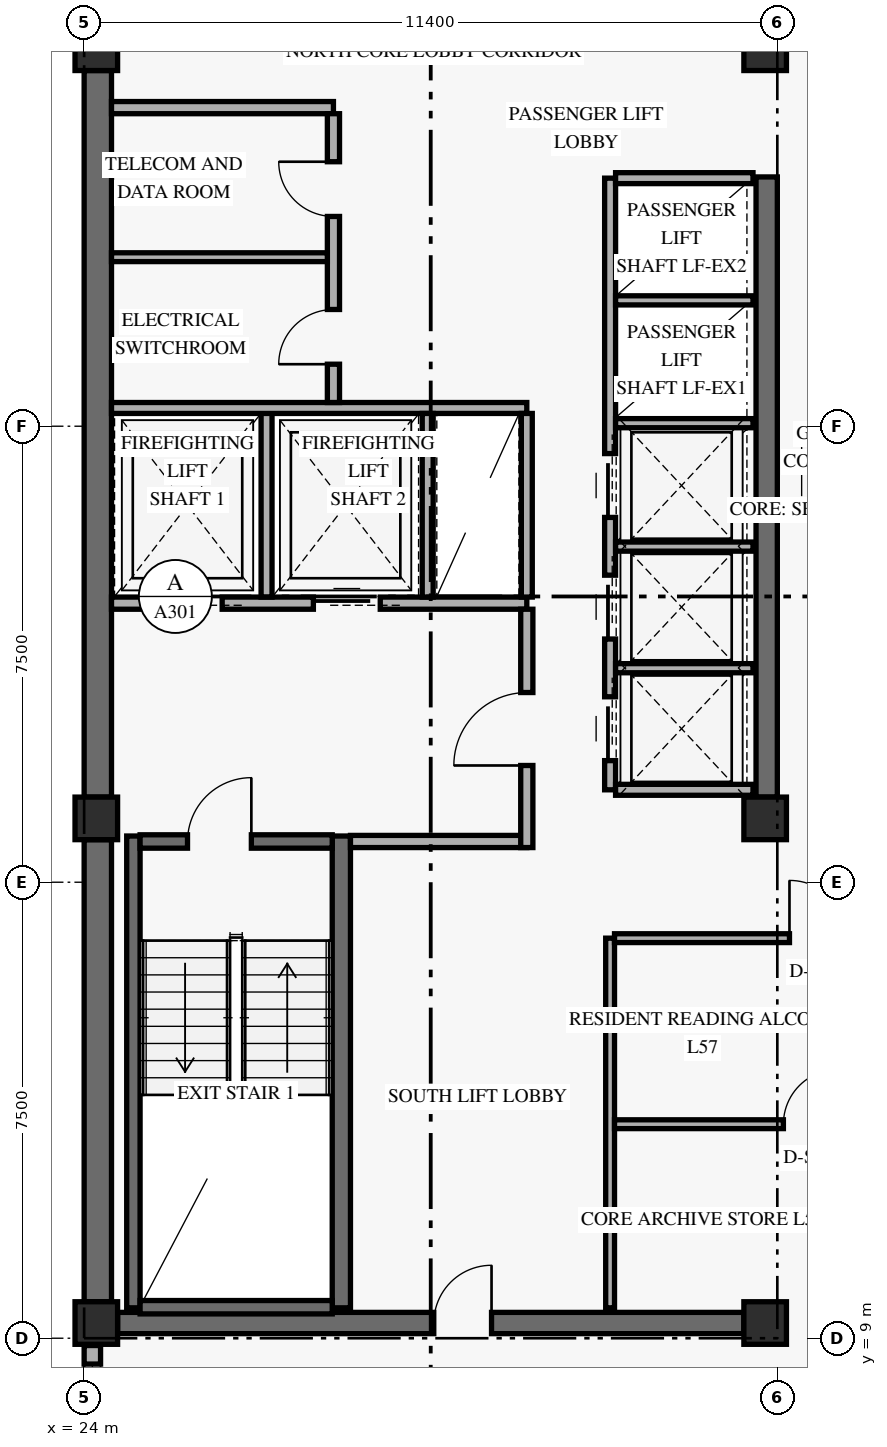
"""IFC4 building model, lengths in metres.
Left out: names, types, materials, properties, quantities, classifications, styles, units other than length and angle.
Written with IfcOpenShell. Run it as: python <this file> out.ifc"""

import sys

from ifc_helpers import new_model, si_unit, direction, frame, frame_2d, origin, origin_2d, place, context, subcontext, project, spatial, rectangle, extrude, element, fill, save


model = new_model("IFC4")
c1 = context("Model", 3, precision=1e-05, world=origin(), true_north=direction((0.0, 1.0)))
c2 = subcontext(c1, "Body", "Model", "MODEL_VIEW")
j1 = project(units=[si_unit("LENGTHUNIT", "METRE"), si_unit("PLANEANGLEUNIT", "RADIAN")], contexts=[c1])
p1 = place(None, origin())
s1 = spatial("IfcSite", under=j1, at=p1, CompositionType="ELEMENT")
p2 = place(p1, origin())
s2 = spatial("IfcBuilding", under=s1, at=p2, CompositionType="ELEMENT")
p3 = place(p2, frame((0.0, 0.0, 220.2)))
s3 = spatial("IfcBuildingStorey", under=s2, at=p3, CompositionType="ELEMENT", Elevation=220.2)
p4 = place(p3, frame((24.225, 9.6, 0.0), z_axis=(0.0, 0.0, 1.0), x_axis=(0.0, 1.0, 0.0)))
e1 = element("IfcWall", 1, at=p4, inside=s3, PredefinedType="SHEAR", context=c2, shape_type="SweptSolid", body=[
    extrude(rectangle(XDim=7.6, YDim=0.45, at=frame_2d((3.8, 0.0))), origin(), (0.0, 0.0, 1.0), 2.821),
])
p5 = place(p3, frame((24.225, 17.9, 0.0), z_axis=(0.0, 0.0, 1.0), x_axis=(0.0, 1.0, 0.0)))
e2 = element("IfcWall", 2, at=p5, inside=s3, PredefinedType="SHEAR", context=c2, shape_type="SweptSolid", body=[
    extrude(rectangle(XDim=11.95, YDim=0.45, at=frame_2d((5.975, 0.0))), origin(), (0.0, 0.0, 1.0), 2.821),
])
p6 = place(p3, frame((35.225, 17.9, 0.0), z_axis=(0.0, 0.0, 1.0), x_axis=(0.0, 1.0, 0.0)))
e3 = element("IfcWall", 3, at=p6, inside=s3, PredefinedType="SHEAR", context=c2, shape_type="SweptSolid", body=[
    extrude(rectangle(XDim=10.2, YDim=0.35, at=frame_2d((5.1, 0.0))), origin(), (0.0, 0.0, 1.0), 2.821),
])
p7 = place(p3, frame((24.55, 9.25, 0.0), z_axis=(0.0, 0.0, 1.0), x_axis=(1.0, 0.0, 0.0)))
e4 = element("IfcWall", 4, at=p7, inside=s3, PredefinedType="SHEAR", context=c2, shape_type="SweptSolid", body=[
    extrude(rectangle(XDim=10.3, YDim=0.35, at=frame_2d((5.15, 0.0))), origin(), (0.0, 0.0, 1.0), 3.36),
])
p8 = place(p7, frame((5.2, 0.0, 0.0)))
e5 = element("IfcOpeningElement", 5, at=p8, cuts=e4, PredefinedType="OPENING", context=c2, shape_type="SweptSolid", body=[
    extrude(rectangle(XDim=0.95, YDim=2.15, at=frame_2d((0.475, 1.075))), frame((0.0, 0.185, 0.0), z_axis=(0.0, -1.0, 0.0), x_axis=(1.0, 0.0, 0.0)), (0.0, 0.0, 1.0), 0.37),
])
p9 = place(p3, frame((24.81, 9.5, 0.0), z_axis=(0.0, 0.0, 1.0), x_axis=(0.0, 1.0, 0.0)))
e6 = element("IfcWall", 6, at=p9, inside=s3, PredefinedType="SHEAR", context=c2, shape_type="SweptSolid", body=[
    extrude(rectangle(XDim=7.76, YDim=0.22, at=frame_2d((3.88, 0.0))), origin(), (0.0, 0.0, 1.0), 3.36),
])
p10 = place(p3, frame((28.23, 9.5, 0.0), z_axis=(0.0, 0.0, 1.0), x_axis=(0.0, 1.0, 0.0)))
e7 = element("IfcWall", 7, at=p10, inside=s3, PredefinedType="SHEAR", context=c2, shape_type="SweptSolid", body=[
    extrude(rectangle(XDim=7.76, YDim=0.3, at=frame_2d((3.88, 0.0))), origin(), (0.0, 0.0, 1.0), 3.36),
])
p11 = place(p3, frame((24.92, 9.51, 0.0), z_axis=(0.0, 0.0, 1.0), x_axis=(1.0, 0.0, 0.0)))
e8 = element("IfcWall", 8, at=p11, inside=s3, PredefinedType="SHEAR", context=c2, shape_type="SweptSolid", body=[
    extrude(rectangle(XDim=3.16, YDim=0.22, at=frame_2d((1.58, 0.0))), origin(), (0.0, 0.0, 1.0), 3.36),
])
p12 = place(p3, frame((24.92, 17.17, 0.0), z_axis=(0.0, 0.0, 1.0), x_axis=(1.0, 0.0, 0.0)))
e9 = element("IfcWall", 9, at=p12, inside=s3, PredefinedType="SHEAR", context=c2, shape_type="SweptSolid", body=[
    extrude(rectangle(XDim=3.16, YDim=0.22, at=frame_2d((1.58, 0.0))), origin(), (0.0, 0.0, 1.0), 3.36),
])
p13 = place(p12, frame((0.78, 0.0, 0.0)))
e10 = element("IfcOpeningElement", 10, at=p13, cuts=e9, PredefinedType="OPENING", context=c2, shape_type="SweptSolid", body=[
    extrude(rectangle(XDim=1.05, YDim=2.15, at=frame_2d((0.525, 1.075))), frame((0.0, 0.12, 0.0), z_axis=(0.0, -1.0, 0.0), x_axis=(1.0, 0.0, 0.0)), (0.0, 0.0, 1.0), 0.24),
])
for number, where, z_axis, x_axis in (
    (11, (24.2, 9.25, 0.0), (0.0, 0.0, 1.0), (1.0, 0.0, 0.0)),
    (12, (24.2, 17.55, 0.0), (0.0, 0.0, 1.0), (1.0, 0.0, 0.0)),
    (13, (24.2, 30.2, 0.0), (0.0, 0.0, 1.0), (1.0, 0.0, 0.0)),
    (14, (35.2, 9.25, 0.0), (0.0, 0.0, 1.0), (1.0, 0.0, 0.0)),
    (15, (35.2, 17.55, 0.0), (0.0, 0.0, 1.0), (1.0, 0.0, 0.0)),
    (16, (35.2, 30.2, 0.0), (0.0, 0.0, 1.0), (1.0, 0.0, 0.0)),
):
    element("IfcColumn", number, at=place(p3, frame(where, z_axis=z_axis, x_axis=x_axis)), inside=s3, PredefinedType="COLUMN", context=c2, shape_type="SweptSolid", body=[
        extrude(rectangle(XDim=0.7, YDim=0.7, at=origin_2d()), origin(), (0.0, 0.0, 1.0), 3.6),
    ])
p14 = place(p3, frame((24.135, 7.32, 0.0), z_axis=(0.0, 0.0, 1.0), x_axis=(0.0, 1.0, 0.0)))
e17 = element("IfcWall", 17, at=p14, inside=s3, PredefinedType="SOLIDWALL", context=c2, shape_type="SweptSolid", body=[
    extrude(rectangle(XDim=1.56, YDim=0.27, at=frame_2d((0.78, 0.0))), origin(), (0.0, 0.0, 1.0), 2.803),
])
p15 = place(p14, frame((0.305, 0.0, 0.85)))
e18 = element("IfcOpeningElement", 18, at=p15, cuts=e17, PredefinedType="OPENING", context=c2, shape_type="SweptSolid", body=[
    extrude(rectangle(XDim=0.95, YDim=1.5, at=frame_2d((0.475, 0.75))), frame((0.0, 0.145, 0.0), z_axis=(0.0, -1.0, 0.0), x_axis=(1.0, 0.0, 0.0)), (0.0, 0.0, 1.0), 0.29),
])
p16 = place(p3, frame((24.45, 21.09, 0.0), z_axis=(0.0, 0.0, 1.0), x_axis=(1.0, 0.0, 0.0)))
e19 = element("IfcWall", 19, at=p16, inside=s3, PredefinedType="STANDARD", context=c2, shape_type="SweptSolid", body=[
    extrude(rectangle(XDim=6.83, YDim=0.2, at=frame_2d((3.415, 0.0))), origin(), (0.0, 0.0, 1.0), 3.36),
])
p17 = place(p16, frame((0.72, 0.0, 0.0)))
e20 = element("IfcOpeningElement", 20, at=p17, cuts=e19, PredefinedType="OPENING", context=c2, shape_type="SweptSolid", body=[
    extrude(rectangle(XDim=1.1, YDim=2.2, at=frame_2d((0.55, 1.1))), frame((0.0, 0.11, 0.0), z_axis=(0.0, -1.0, 0.0), x_axis=(1.0, 0.0, 0.0)), (0.0, 0.0, 1.0), 0.22),
])
p18 = place(p16, frame((3.32, 0.0, 0.0)))
e21 = element("IfcOpeningElement", 21, at=p18, cuts=e19, PredefinedType="OPENING", context=c2, shape_type="SweptSolid", body=[
    extrude(rectangle(XDim=1.1, YDim=2.2, at=frame_2d((0.55, 1.1))), frame((0.0, 0.11, 0.0), z_axis=(0.0, -1.0, 0.0), x_axis=(1.0, 0.0, 0.0)), (0.0, 0.0, 1.0), 0.22),
])
p19 = place(p3, frame((28.38, 17.17, 0.0), z_axis=(0.0, 0.0, 1.0), x_axis=(1.0, 0.0, 0.0)))
e22 = element("IfcWall", 22, at=p19, inside=s3, PredefinedType="STANDARD", context=c2, shape_type="SweptSolid", body=[
    extrude(rectangle(XDim=2.9, YDim=0.2, at=frame_2d((1.45, 0.0))), origin(), (0.0, 0.0, 1.0), 3.36),
])
p20 = place(p3, frame((31.28, 17.07, 0.0), z_axis=(0.0, 0.0, 1.0), x_axis=(0.0, 1.0, 0.0)))
e23 = element("IfcWall", 23, at=p20, inside=s3, PredefinedType="STANDARD", context=c2, shape_type="SweptSolid", body=[
    extrude(rectangle(XDim=3.92, YDim=0.2, at=frame_2d((1.96, 0.0))), origin(), (0.0, 0.0, 1.0), 2.803),
])
p21 = place(p20, frame((1.35, 0.0, 0.0)))
e24 = element("IfcOpeningElement", 24, at=p21, cuts=e23, PredefinedType="OPENING", context=c2, shape_type="SweptSolid", body=[
    extrude(rectangle(XDim=1.2, YDim=2.15, at=frame_2d((0.6, 1.075))), frame((0.0, 0.11, 0.0), z_axis=(0.0, -1.0, 0.0), x_axis=(1.0, 0.0, 0.0)), (0.0, 0.0, 1.0), 0.22),
])
p22 = place(p3, frame((27.0, 21.19, 0.0), z_axis=(0.0, 0.0, 1.0), x_axis=(0.0, 1.0, 0.0)))
e25 = element("IfcWall", 25, at=p22, inside=s3, PredefinedType="STANDARD", context=c2, shape_type="SweptSolid", body=[
    extrude(rectangle(XDim=3.11, YDim=0.18, at=frame_2d((1.555, 0.0))), origin(), (0.0, 0.0, 1.0), 3.36),
])
p23 = place(p3, frame((24.45, 24.3, 0.0), z_axis=(0.0, 0.0, 1.0), x_axis=(1.0, 0.0, 0.0)))
e26 = element("IfcWall", 26, at=p23, inside=s3, PredefinedType="STANDARD", context=c2, shape_type="SweptSolid", body=[
    extrude(rectangle(XDim=6.83, YDim=0.18, at=frame_2d((3.415, 0.0))), origin(), (0.0, 0.0, 1.0), 3.36),
])
for number, where, z_axis, x_axis in (
    (27, (29.65, 21.19, 0.0), (0.0, 0.0, 1.0), (0.0, 1.0, 0.0)),
    (28, (31.28, 21.19, 0.0), (0.0, 0.0, 1.0), (0.0, 1.0, 0.0)),
):
    element("IfcWall", number, at=place(p3, frame(where, z_axis=z_axis, x_axis=x_axis)), inside=s3, PredefinedType="STANDARD", context=c2, shape_type="SweptSolid", body=[
        extrude(rectangle(XDim=3.02, YDim=0.18, at=frame_2d((1.51, 0.0))), origin(), (0.0, 0.0, 1.0), 3.36),
    ])
p24 = place(p3, frame((24.45, 29.24, 0.0), z_axis=(0.0, 0.0, 1.0), x_axis=(1.0, 0.0, 0.0)))
e29 = element("IfcWall", 29, at=p24, inside=s3, PredefinedType="STANDARD", context=c2, shape_type="SweptSolid", body=[
    extrude(rectangle(XDim=3.65, YDim=0.2, at=frame_2d((1.825, 0.0))), origin(), (0.0, 0.0, 1.0), 3.36),
])
p25 = place(p3, frame((28.1, 24.39, 0.0), z_axis=(0.0, 0.0, 1.0), x_axis=(0.0, 1.0, 0.0)))
e30 = element("IfcWall", 30, at=p25, inside=s3, PredefinedType="STANDARD", context=c2, shape_type="SweptSolid", body=[
    extrude(rectangle(XDim=4.75, YDim=0.2, at=frame_2d((2.375, 0.0))), origin(), (0.0, 0.0, 1.0), 3.36),
])
p26 = place(p25, frame((0.63, 0.0, 0.0)))
e31 = element("IfcOpeningElement", 31, at=p26, cuts=e30, PredefinedType="OPENING", context=c2, shape_type="SweptSolid", body=[
    extrude(rectangle(XDim=0.9, YDim=2.1, at=frame_2d((0.45, 1.05))), frame((0.0, 0.11, 0.0), z_axis=(0.0, -1.0, 0.0), x_axis=(1.0, 0.0, 0.0)), (0.0, 0.0, 1.0), 0.22),
])
p27 = place(p25, frame((3.06, 0.0, 0.0)))
e32 = element("IfcOpeningElement", 32, at=p27, cuts=e30, PredefinedType="OPENING", context=c2, shape_type="SweptSolid", body=[
    extrude(rectangle(XDim=0.9, YDim=2.1, at=frame_2d((0.45, 1.05))), frame((0.0, 0.11, 0.0), z_axis=(0.0, -1.0, 0.0), x_axis=(1.0, 0.0, 0.0)), (0.0, 0.0, 1.0), 0.22),
])
p28 = place(p3, frame((24.45, 26.78, 0.0), z_axis=(0.0, 0.0, 1.0), x_axis=(1.0, 0.0, 0.0)))
e33 = element("IfcWall", 33, at=p28, inside=s3, PredefinedType="PARTITIONING", context=c2, shape_type="SweptSolid", body=[
    extrude(rectangle(XDim=3.55, YDim=0.145, at=frame_2d((1.775, 0.0))), origin(), (0.0, 0.0, 1.0), 3.36),
])
p29 = place(p3, frame((32.65, 18.02, 0.0), z_axis=(0.0, 0.0, 1.0), x_axis=(0.0, 1.0, 0.0)))
e34 = element("IfcWall", 34, at=p29, inside=s3, PredefinedType="STANDARD", context=c2, shape_type="SweptSolid", body=[
    extrude(rectangle(XDim=10.06, YDim=0.18, at=frame_2d((5.03, 0.0))), origin(), (0.0, 0.0, 1.0), 3.36),
])
p30 = place(p29, frame((0.48, 0.0, 0.0)))
e35 = element("IfcOpeningElement", 35, at=p30, cuts=e34, PredefinedType="OPENING", context=c2, shape_type="SweptSolid", body=[
    extrude(rectangle(XDim=1.05, YDim=2.2, at=frame_2d((0.525, 1.1))), frame((0.0, 0.1, 0.0), z_axis=(0.0, -1.0, 0.0), x_axis=(1.0, 0.0, 0.0)), (0.0, 0.0, 1.0), 0.2),
])
p31 = place(p29, frame((2.48, 0.0, 0.0)))
e36 = element("IfcOpeningElement", 36, at=p31, cuts=e34, PredefinedType="OPENING", context=c2, shape_type="SweptSolid", body=[
    extrude(rectangle(XDim=1.05, YDim=2.2, at=frame_2d((0.525, 1.1))), frame((0.0, 0.1, 0.0), z_axis=(0.0, -1.0, 0.0), x_axis=(1.0, 0.0, 0.0)), (0.0, 0.0, 1.0), 0.2),
])
p32 = place(p29, frame((4.48, 0.0, 0.0)))
e37 = element("IfcOpeningElement", 37, at=p32, cuts=e34, PredefinedType="OPENING", context=c2, shape_type="SweptSolid", body=[
    extrude(rectangle(XDim=1.05, YDim=2.2, at=frame_2d((0.525, 1.1))), frame((0.0, 0.1, 0.0), z_axis=(0.0, -1.0, 0.0), x_axis=(1.0, 0.0, 0.0)), (0.0, 0.0, 1.0), 0.2),
])
for number, where, z_axis, x_axis in (
    (38, (32.74, 18.02, 0.0), (0.0, 0.0, 1.0), (1.0, 0.0, 0.0)),
    (39, (32.74, 28.08, 0.0), (0.0, 0.0, 1.0), (1.0, 0.0, 0.0)),
):
    element("IfcWall", number, at=place(p3, frame(where, z_axis=z_axis, x_axis=x_axis)), inside=s3, PredefinedType="STANDARD", context=c2, shape_type="SweptSolid", body=[
        extrude(rectangle(XDim=2.26, YDim=0.18, at=frame_2d((1.13, 0.0))), origin(), (0.0, 0.0, 1.0), 3.36),
    ])
for number, where, z_axis, x_axis in (
    (40, (32.74, 20.02, 0.0), (0.0, 0.0, 1.0), (1.0, 0.0, 0.0)),
    (41, (32.74, 22.02, 0.0), (0.0, 0.0, 1.0), (1.0, 0.0, 0.0)),
    (42, (32.74, 24.05, 0.0), (0.0, 0.0, 1.0), (1.0, 0.0, 0.0)),
    (43, (32.74, 26.07, 0.0), (0.0, 0.0, 1.0), (1.0, 0.0, 0.0)),
):
    element("IfcWall", number, at=place(p3, frame(where, z_axis=z_axis, x_axis=x_axis)), inside=s3, PredefinedType="STANDARD", context=c2, shape_type="SweptSolid", body=[
        extrude(rectangle(XDim=2.26, YDim=0.15, at=frame_2d((1.13, 0.0))), origin(), (0.0, 0.0, 1.0), 3.36),
    ])
p33 = place(p3, frame((32.65, 9.5, 0.0), z_axis=(0.0, 0.0, 1.0), x_axis=(0.0, 1.0, 0.0)))
e44 = element("IfcWall", 44, at=p33, inside=s3, PredefinedType="PARTITIONING", context=c2, shape_type="SweptSolid", body=[
    extrude(rectangle(XDim=6.08, YDim=0.145, at=frame_2d((3.04, 0.0))), origin(), (0.0, 0.0, 1.0), 3.36),
])
p34 = place(p3, frame((32.722, 15.58, 0.0), z_axis=(0.0, 0.0, 1.0), x_axis=(1.0, 0.0, 0.0)))
e45 = element("IfcWall", 45, at=p34, inside=s3, PredefinedType="PARTITIONING", context=c2, shape_type="SweptSolid", body=[
    extrude(rectangle(XDim=5.628, YDim=0.145, at=frame_2d((2.814, 0.0))), origin(), (0.0, 0.0, 1.0), 2.803),
])
p35 = place(p34, frame((2.877, 0.0, 0.0)))
e46 = element("IfcOpeningElement", 46, at=p35, cuts=e45, PredefinedType="OPENING", context=c2, shape_type="SweptSolid", body=[
    extrude(rectangle(XDim=0.95, YDim=2.15, at=frame_2d((0.475, 1.075))), frame((0.0, 0.083, 0.0), z_axis=(0.0, -1.0, 0.0), x_axis=(1.0, 0.0, 0.0)), (0.0, 0.0, 1.0), 0.165),
])
p36 = place(p3, frame((32.722, 12.52, 0.0), z_axis=(0.0, 0.0, 1.0), x_axis=(1.0, 0.0, 0.0)))
e47 = element("IfcWall", 47, at=p36, inside=s3, PredefinedType="PARTITIONING", context=c2, shape_type="SweptSolid", body=[
    extrude(rectangle(XDim=5.555, YDim=0.145, at=frame_2d((2.778, 0.0))), origin(), (0.0, 0.0, 1.0), 2.803),
])
p37 = place(p36, frame((2.778, 0.0, 0.0)))
e48 = element("IfcOpeningElement", 48, at=p37, cuts=e47, PredefinedType="OPENING", context=c2, shape_type="SweptSolid", body=[
    extrude(rectangle(XDim=0.9, YDim=2.1, at=frame_2d((0.45, 1.05))), frame((0.0, 0.083, 0.0), z_axis=(0.0, -1.0, 0.0), x_axis=(1.0, 0.0, 0.0)), (0.0, 0.0, 1.0), 0.165),
])
p38 = place(p15, origin())
e49 = element("IfcWindow", 49, at=p38, inside=s3, PartitioningType="SINGLE_PANEL", PredefinedType="WINDOW", context=c2, shape_type="SweptSolid", body=[
    extrude(rectangle(XDim=0.95, YDim=1.5, at=frame_2d((0.475, 0.75))), frame((0.0, 0.03, 0.0), z_axis=(0.0, -1.0, 0.0), x_axis=(1.0, 0.0, 0.0)), (0.0, 0.0, 1.0), 0.06),
])
fill(e18, e49)
p39 = place(p13, frame((1.05, 0.0, 0.0), z_axis=(0.0, 0.0, 1.0), x_axis=(-1.0, 0.0, 0.0)))
e50 = element("IfcDoor", 50, at=p39, inside=s3, OperationType="SINGLE_SWING_LEFT", PredefinedType="DOOR", context=c2, shape_type="SweptSolid", body=[
    extrude(rectangle(XDim=1.05, YDim=2.15, at=frame_2d((0.525, 1.075))), frame((0.0, 0.025, 0.0), z_axis=(0.0, -1.0, 0.0), x_axis=(1.0, 0.0, 0.0)), (0.0, 0.0, 1.0), 0.05),
])
fill(e10, e50)
p40 = place(p17, origin())
e51 = element("IfcDoor", 51, at=p40, inside=s3, OperationType="SLIDING_TO_LEFT", PredefinedType="DOOR", context=c2, shape_type="SweptSolid", body=[
    extrude(rectangle(XDim=1.1, YDim=2.2, at=frame_2d((0.55, 1.1))), frame((0.0, 0.025, 0.0), z_axis=(0.0, -1.0, 0.0), x_axis=(1.0, 0.0, 0.0)), (0.0, 0.0, 1.0), 0.05),
])
fill(e20, e51)
p41 = place(p18, origin())
e52 = element("IfcDoor", 52, at=p41, inside=s3, OperationType="SLIDING_TO_LEFT", PredefinedType="DOOR", context=c2, shape_type="SweptSolid", body=[
    extrude(rectangle(XDim=1.1, YDim=2.2, at=frame_2d((0.55, 1.1))), frame((0.0, 0.025, 0.0), z_axis=(0.0, -1.0, 0.0), x_axis=(1.0, 0.0, 0.0)), (0.0, 0.0, 1.0), 0.05),
])
fill(e21, e52)
p42 = place(p21, origin())
e53 = element("IfcDoor", 53, at=p42, inside=s3, OperationType="SINGLE_SWING_LEFT", PredefinedType="DOOR", context=c2, shape_type="SweptSolid", body=[
    extrude(rectangle(XDim=1.2, YDim=2.15, at=frame_2d((0.6, 1.075))), frame((0.0, 0.025, 0.0), z_axis=(0.0, -1.0, 0.0), x_axis=(1.0, 0.0, 0.0)), (0.0, 0.0, 1.0), 0.05),
])
fill(e24, e53)
p43 = place(p26, origin())
e54 = element("IfcDoor", 54, at=p43, inside=s3, OperationType="SINGLE_SWING_LEFT", PredefinedType="DOOR", context=c2, shape_type="SweptSolid", body=[
    extrude(rectangle(XDim=0.9, YDim=2.1, at=frame_2d((0.45, 1.05))), frame((0.0, 0.025, 0.0), z_axis=(0.0, -1.0, 0.0), x_axis=(1.0, 0.0, 0.0)), (0.0, 0.0, 1.0), 0.05),
])
fill(e31, e54)
p44 = place(p27, origin())
e55 = element("IfcDoor", 55, at=p44, inside=s3, OperationType="SINGLE_SWING_RIGHT", PredefinedType="DOOR", context=c2, shape_type="SweptSolid", body=[
    extrude(rectangle(XDim=0.9, YDim=2.1, at=frame_2d((0.45, 1.05))), frame((0.0, 0.025, 0.0), z_axis=(0.0, -1.0, 0.0), x_axis=(1.0, 0.0, 0.0)), (0.0, 0.0, 1.0), 0.05),
])
fill(e32, e55)
p45 = place(p30, origin())
e56 = element("IfcDoor", 56, at=p45, inside=s3, OperationType="SLIDING_TO_LEFT", PredefinedType="DOOR", context=c2, shape_type="SweptSolid", body=[
    extrude(rectangle(XDim=1.05, YDim=2.2, at=frame_2d((0.525, 1.1))), frame((0.0, 0.025, 0.0), z_axis=(0.0, -1.0, 0.0), x_axis=(1.0, 0.0, 0.0)), (0.0, 0.0, 1.0), 0.05),
])
fill(e35, e56)
p46 = place(p31, origin())
e57 = element("IfcDoor", 57, at=p46, inside=s3, OperationType="SLIDING_TO_LEFT", PredefinedType="DOOR", context=c2, shape_type="SweptSolid", body=[
    extrude(rectangle(XDim=1.05, YDim=2.2, at=frame_2d((0.525, 1.1))), frame((0.0, 0.025, 0.0), z_axis=(0.0, -1.0, 0.0), x_axis=(1.0, 0.0, 0.0)), (0.0, 0.0, 1.0), 0.05),
])
fill(e36, e57)
p47 = place(p32, origin())
e58 = element("IfcDoor", 58, at=p47, inside=s3, OperationType="SLIDING_TO_LEFT", PredefinedType="DOOR", context=c2, shape_type="SweptSolid", body=[
    extrude(rectangle(XDim=1.05, YDim=2.2, at=frame_2d((0.525, 1.1))), frame((0.0, 0.025, 0.0), z_axis=(0.0, -1.0, 0.0), x_axis=(1.0, 0.0, 0.0)), (0.0, 0.0, 1.0), 0.05),
])
fill(e37, e58)
p48 = place(p35, origin())
e59 = element("IfcDoor", 59, at=p48, inside=s3, OperationType="SINGLE_SWING_LEFT", PredefinedType="DOOR", context=c2, shape_type="SweptSolid", body=[
    extrude(rectangle(XDim=0.95, YDim=2.15, at=frame_2d((0.475, 1.075))), frame((0.0, 0.025, 0.0), z_axis=(0.0, -1.0, 0.0), x_axis=(1.0, 0.0, 0.0)), (0.0, 0.0, 1.0), 0.05),
])
fill(e46, e59)
p49 = place(p37, origin())
e60 = element("IfcDoor", 60, at=p49, inside=s3, OperationType="SINGLE_SWING_RIGHT", PredefinedType="DOOR", context=c2, shape_type="SweptSolid", body=[
    extrude(rectangle(XDim=0.9, YDim=2.1, at=frame_2d((0.45, 1.05))), frame((0.0, 0.025, 0.0), z_axis=(0.0, -1.0, 0.0), x_axis=(1.0, 0.0, 0.0)), (0.0, 0.0, 1.0), 0.05),
])
fill(e48, e60)
p50 = place(p8, frame((0.95, 0.0, 0.0), z_axis=(0.0, 0.0, 1.0), x_axis=(-1.0, 0.0, 0.0)))
e61 = element("IfcDoor", 61, at=p50, inside=s3, OperationType="SINGLE_SWING_LEFT", PredefinedType="DOOR", context=c2, shape_type="SweptSolid", body=[
    extrude(rectangle(XDim=0.95, YDim=2.15, at=frame_2d((0.475, 1.075))), frame((0.0, 0.025, 0.0), z_axis=(0.0, -1.0, 0.0), x_axis=(1.0, 0.0, 0.0)), (0.0, 0.0, 1.0), 0.05),
])
fill(e5, e61)
save(model, sys.argv[1])
